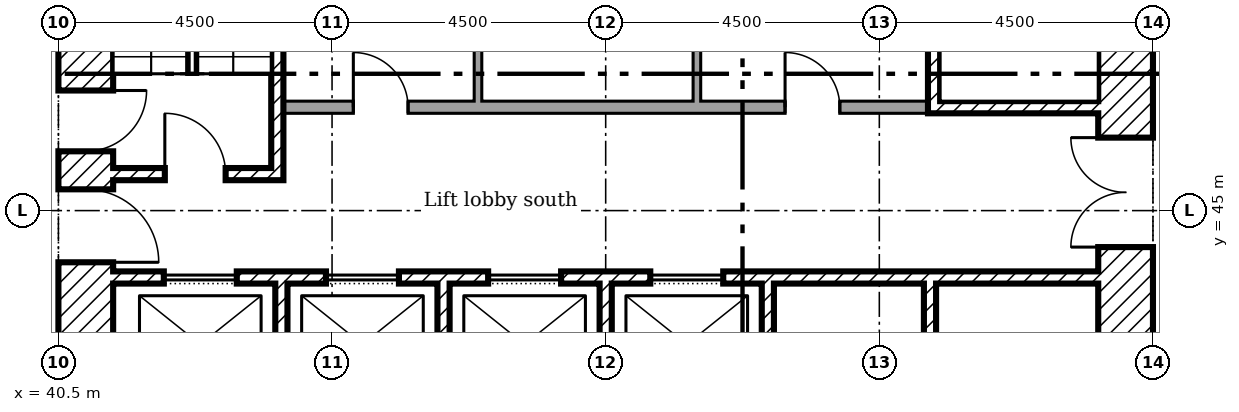
"""IFC4 building model, lengths in metres.
Left out: names, types, materials, properties, quantities, classifications, styles, units other than length and angle.
Written with IfcOpenShell. Run it as: python <this file> out.ifc"""

import sys

from ifc_helpers import new_model, si_unit, direction, frame, frame_2d, origin, place, context, subcontext, project, spatial, rectangle, extrude, element, fill, save


model = new_model("IFC4")
c1 = context("Model", 3, precision=1e-05, world=origin(), true_north=direction((0.0, 1.0)))
c2 = subcontext(c1, "Body", "Model", "MODEL_VIEW")
j1 = project(units=[si_unit("LENGTHUNIT", "METRE"), si_unit("PLANEANGLEUNIT", "RADIAN")], contexts=[c1])
p1 = place(None, origin())
s1 = spatial("IfcSite", under=j1, at=p1, CompositionType="ELEMENT")
p2 = place(p1, origin())
s2 = spatial("IfcBuilding", under=s1, at=p2, CompositionType="ELEMENT")
p3 = place(p2, frame((0.0, 0.0, 29.8)))
s3 = spatial("IfcBuildingStorey", under=s2, at=p3, CompositionType="ELEMENT", Elevation=29.8)
p4 = place(p3, frame((58.05, 40.5, 0.0), z_axis=(0.0, 0.0, 1.0), x_axis=(0.0, 1.0, 0.0)))
e1 = element("IfcWall", 1, at=p4, inside=s3, PredefinedType="SHEAR", context=c2, shape_type="SweptSolid", body=[
    extrude(rectangle(XDim=18.0, YDim=0.9, at=frame_2d((9.0, 0.0))), origin(), (0.0, 0.0, 1.0), 4.125),
])
p5 = place(p4, frame((13.15, 0.0, 0.0)))
e2 = element("IfcOpeningElement", 2, at=p5, cuts=e1, PredefinedType="OPENING", context=c2, shape_type="SweptSolid", body=[
    extrude(rectangle(XDim=1.2, YDim=2.1, at=frame_2d((0.6, 1.05))), frame((0.0, 0.46, 0.0), z_axis=(0.0, -1.0, 0.0), x_axis=(1.0, 0.0, 0.0)), (0.0, 0.0, 1.0), 0.92),
])
p6 = place(p4, frame((3.9, 0.0, 0.0)))
e3 = element("IfcOpeningElement", 3, at=p6, cuts=e1, PredefinedType="OPENING", context=c2, shape_type="SweptSolid", body=[
    extrude(rectangle(XDim=1.8, YDim=2.1, at=frame_2d((0.9, 1.05))), frame((0.0, 0.46, 0.0), z_axis=(0.0, -1.0, 0.0), x_axis=(1.0, 0.0, 0.0)), (0.0, 0.0, 1.0), 0.92),
])
p7 = place(p4, frame((11.525, 0.0, 0.0)))
e4 = element("IfcOpeningElement", 4, at=p7, cuts=e1, PredefinedType="OPENING", context=c2, shape_type="SweptSolid", body=[
    extrude(rectangle(XDim=1.0, YDim=2.1, at=frame_2d((0.5, 1.05))), frame((0.0, 0.46, 0.0), z_axis=(0.0, -1.0, 0.0), x_axis=(1.0, 0.0, 0.0)), (0.0, 0.0, 1.0), 0.92),
])
p8 = place(p3, frame((40.95, 40.5, 0.0), z_axis=(0.0, 0.0, 1.0), x_axis=(0.0, 1.0, 0.0)))
e5 = element("IfcWall", 5, at=p8, inside=s3, PredefinedType="SHEAR", context=c2, shape_type="SweptSolid", body=[
    extrude(rectangle(XDim=18.0, YDim=0.9, at=frame_2d((9.0, 0.0))), origin(), (0.0, 0.0, 1.0), 4.125),
])
p9 = place(p8, frame((3.65, 0.0, 0.0)))
e6 = element("IfcOpeningElement", 6, at=p9, cuts=e5, PredefinedType="OPENING", context=c2, shape_type="SweptSolid", body=[
    extrude(rectangle(XDim=1.2, YDim=2.1, at=frame_2d((0.6, 1.05))), frame((0.0, 0.46, 0.0), z_axis=(0.0, -1.0, 0.0), x_axis=(1.0, 0.0, 0.0)), (0.0, 0.0, 1.0), 0.92),
])
p10 = place(p8, frame((5.475, 0.0, 0.0)))
e7 = element("IfcOpeningElement", 7, at=p10, cuts=e5, PredefinedType="OPENING", context=c2, shape_type="SweptSolid", body=[
    extrude(rectangle(XDim=1.0, YDim=2.1, at=frame_2d((0.5, 1.05))), frame((0.0, 0.46, 0.0), z_axis=(0.0, -1.0, 0.0), x_axis=(1.0, 0.0, 0.0)), (0.0, 0.0, 1.0), 0.92),
])
p11 = place(p8, frame((12.3, 0.0, 0.0)))
e8 = element("IfcOpeningElement", 8, at=p11, cuts=e5, PredefinedType="OPENING", context=c2, shape_type="SweptSolid", body=[
    extrude(rectangle(XDim=1.0, YDim=2.1, at=frame_2d((0.5, 1.05))), frame((0.0, 0.46, 0.0), z_axis=(0.0, -1.0, 0.0), x_axis=(1.0, 0.0, 0.0)), (0.0, 0.0, 1.0), 0.92),
])
for number, where, z_axis, x_axis in (
    (9, (44.167, 41.4, 0.0), (0.0, 0.0, 1.0), (0.0, 1.0, 0.0)),
    (10, (46.833, 41.4, 0.0), (0.0, 0.0, 1.0), (0.0, 1.0, 0.0)),
    (11, (49.5, 41.4, 0.0), (0.0, 0.0, 1.0), (0.0, 1.0, 0.0)),
    (12, (52.167, 41.4, 0.0), (0.0, 0.0, 1.0), (0.0, 1.0, 0.0)),
    (13, (54.833, 41.4, 0.0), (0.0, 0.0, 1.0), (0.0, 1.0, 0.0)),
):
    element("IfcWall", number, at=place(p3, frame(where, z_axis=z_axis, x_axis=x_axis)), inside=s3, PredefinedType="SHEAR", context=c2, shape_type="SweptSolid", body=[
        extrude(rectangle(XDim=2.4, YDim=0.2, at=frame_2d((1.2, 0.0))), origin(), (0.0, 0.0, 1.0), 4.125),
    ])
p12 = place(p3, frame((41.4, 43.9, 0.0)))
e14 = element("IfcWall", 14, at=p12, inside=s3, PredefinedType="SHEAR", context=c2, shape_type="SweptSolid", body=[
    extrude(rectangle(XDim=16.2, YDim=0.2, at=frame_2d((8.1, 0.0))), origin(), (0.0, 0.0, 1.0), 4.125),
])
p13 = place(p12, frame((0.833, 0.0, 0.0)))
e15 = element("IfcOpeningElement", 15, at=p13, cuts=e14, PredefinedType="OPENING", context=c2, shape_type="SweptSolid", body=[
    extrude(rectangle(XDim=1.2, YDim=2.1, at=frame_2d((0.6, 1.05))), frame((0.0, 0.11, 0.0), z_axis=(0.0, -1.0, 0.0), x_axis=(1.0, 0.0, 0.0)), (0.0, 0.0, 1.0), 0.22),
])
p14 = place(p12, frame((3.5, 0.0, 0.0)))
e16 = element("IfcOpeningElement", 16, at=p14, cuts=e14, PredefinedType="OPENING", context=c2, shape_type="SweptSolid", body=[
    extrude(rectangle(XDim=1.2, YDim=2.1, at=frame_2d((0.6, 1.05))), frame((0.0, 0.11, 0.0), z_axis=(0.0, -1.0, 0.0), x_axis=(1.0, 0.0, 0.0)), (0.0, 0.0, 1.0), 0.22),
])
p15 = place(p12, frame((6.167, 0.0, 0.0)))
e17 = element("IfcOpeningElement", 17, at=p15, cuts=e14, PredefinedType="OPENING", context=c2, shape_type="SweptSolid", body=[
    extrude(rectangle(XDim=1.2, YDim=2.1, at=frame_2d((0.6, 1.05))), frame((0.0, 0.11, 0.0), z_axis=(0.0, -1.0, 0.0), x_axis=(1.0, 0.0, 0.0)), (0.0, 0.0, 1.0), 0.22),
])
p16 = place(p12, frame((8.833, 0.0, 0.0)))
e18 = element("IfcOpeningElement", 18, at=p16, cuts=e14, PredefinedType="OPENING", context=c2, shape_type="SweptSolid", body=[
    extrude(rectangle(XDim=1.2, YDim=2.1, at=frame_2d((0.6, 1.05))), frame((0.0, 0.11, 0.0), z_axis=(0.0, -1.0, 0.0), x_axis=(1.0, 0.0, 0.0)), (0.0, 0.0, 1.0), 0.22),
])
p17 = place(p3, frame((44.1, 45.5, 0.0), z_axis=(0.0, 0.0, 1.0), x_axis=(0.0, 1.0, 0.0)))
e19 = element("IfcWall", 19, at=p17, inside=s3, PredefinedType="SHEAR", context=c2, shape_type="SweptSolid", body=[
    extrude(rectangle(XDim=6.9, YDim=0.2, at=frame_2d((3.45, 0.0))), origin(), (0.0, 0.0, 1.0), 4.125),
])
p18 = place(p3, frame((41.4, 45.6, 0.0)))
e20 = element("IfcWall", 20, at=p18, inside=s3, PredefinedType="SHEAR", context=c2, shape_type="SweptSolid", body=[
    extrude(rectangle(XDim=2.6, YDim=0.2, at=frame_2d((1.3, 0.0))), origin(), (0.0, 0.0, 1.0), 4.125),
])
p19 = place(p18, frame((0.85, 0.0, 0.0)))
e21 = element("IfcOpeningElement", 21, at=p19, cuts=e20, PredefinedType="OPENING", context=c2, shape_type="SweptSolid", body=[
    extrude(rectangle(XDim=1.0, YDim=2.1, at=frame_2d((0.5, 1.05))), frame((0.0, 0.11, 0.0), z_axis=(0.0, -1.0, 0.0), x_axis=(1.0, 0.0, 0.0)), (0.0, 0.0, 1.0), 0.22),
])
p20 = place(p3, frame((54.8, 46.7, 0.0)))
e22 = element("IfcWall", 22, at=p20, inside=s3, PredefinedType="SHEAR", context=c2, shape_type="SweptSolid", body=[
    extrude(rectangle(XDim=2.8, YDim=0.2, at=frame_2d((1.4, 0.0))), origin(), (0.0, 0.0, 1.0), 4.125),
])
p21 = place(p3, frame((54.9, 46.8, 0.0), z_axis=(0.0, 0.0, 1.0), x_axis=(0.0, 1.0, 0.0)))
e23 = element("IfcWall", 23, at=p21, inside=s3, PredefinedType="SHEAR", context=c2, shape_type="SweptSolid", body=[
    extrude(rectangle(XDim=6.5, YDim=0.2, at=frame_2d((3.25, 0.0))), origin(), (0.0, 0.0, 1.0), 4.125),
])
p22 = place(p3, frame((44.2, 46.7, 0.0)))
e24 = element("IfcWall", 24, at=p22, inside=s3, PredefinedType="PARTITIONING", context=c2, shape_type="SweptSolid", body=[
    extrude(rectangle(XDim=10.6, YDim=0.2, at=frame_2d((5.3, 0.0))), origin(), (0.0, 0.0, 1.0), 4.125),
])
p23 = place(p22, frame((1.15, 0.0, 0.0)))
e25 = element("IfcOpeningElement", 25, at=p23, cuts=e24, PredefinedType="OPENING", context=c2, shape_type="SweptSolid", body=[
    extrude(rectangle(XDim=0.9, YDim=2.1, at=frame_2d((0.45, 1.05))), frame((0.0, 0.11, 0.0), z_axis=(0.0, -1.0, 0.0), x_axis=(1.0, 0.0, 0.0)), (0.0, 0.0, 1.0), 0.22),
])
p24 = place(p22, frame((8.25, 0.0, 0.0)))
e26 = element("IfcOpeningElement", 26, at=p24, cuts=e24, PredefinedType="OPENING", context=c2, shape_type="SweptSolid", body=[
    extrude(rectangle(XDim=0.9, YDim=2.1, at=frame_2d((0.45, 1.05))), frame((0.0, 0.11, 0.0), z_axis=(0.0, -1.0, 0.0), x_axis=(1.0, 0.0, 0.0)), (0.0, 0.0, 1.0), 0.22),
])
p25 = place(p3, frame((47.4, 46.8, 0.0), z_axis=(0.0, 0.0, 1.0), x_axis=(0.0, 1.0, 0.0)))
e27 = element("IfcWall", 27, at=p25, inside=s3, PredefinedType="PARTITIONING", context=c2, shape_type="SweptSolid", body=[
    extrude(rectangle(XDim=5.0, YDim=0.125, at=frame_2d((2.5, 0.0))), origin(), (0.0, 0.0, 1.0), 4.125),
])
p26 = place(p3, frame((51.0, 46.8, 0.0), z_axis=(0.0, 0.0, 1.0), x_axis=(0.0, 1.0, 0.0)))
e28 = element("IfcWall", 28, at=p26, inside=s3, PredefinedType="PARTITIONING", context=c2, shape_type="SweptSolid", body=[
    extrude(rectangle(XDim=2.262, YDim=0.125, at=frame_2d((1.131, 0.0))), origin(), (0.0, 0.0, 1.0), 4.125),
])
p27 = place(p6, origin())
e29 = element("IfcDoor", 29, at=p27, inside=s3, OperationType="DOUBLE_DOOR_SINGLE_SWING", PredefinedType="DOOR", context=c2, shape_type="SweptSolid", body=[
    extrude(rectangle(XDim=1.8, YDim=2.1, at=frame_2d((0.9, 1.05))), frame((0.0, 0.025, 0.0), z_axis=(0.0, -1.0, 0.0), x_axis=(1.0, 0.0, 0.0)), (0.0, 0.0, 1.0), 0.05),
])
fill(e3, e29)
p28 = place(p9, frame((1.2, 0.0, 0.0), x_axis=(-1.0, 0.0, 0.0)))
e30 = element("IfcDoor", 30, at=p28, inside=s3, OperationType="SINGLE_SWING_LEFT", PredefinedType="DOOR", context=c2, shape_type="SweptSolid", body=[
    extrude(rectangle(XDim=1.2, YDim=2.1, at=frame_2d((0.6, 1.05))), frame((0.0, 0.025, 0.0), z_axis=(0.0, -1.0, 0.0), x_axis=(1.0, 0.0, 0.0)), (0.0, 0.0, 1.0), 0.05),
])
fill(e6, e30)
p29 = place(p19, origin())
e31 = element("IfcDoor", 31, at=p29, inside=s3, OperationType="SINGLE_SWING_RIGHT", PredefinedType="DOOR", context=c2, shape_type="SweptSolid", body=[
    extrude(rectangle(XDim=1.0, YDim=2.1, at=frame_2d((0.5, 1.05))), frame((0.0, 0.025, 0.0), z_axis=(0.0, -1.0, 0.0), x_axis=(1.0, 0.0, 0.0)), (0.0, 0.0, 1.0), 0.05),
])
fill(e21, e31)
p30 = place(p10, frame((1.0, 0.0, 0.0), x_axis=(-1.0, 0.0, 0.0)))
e32 = element("IfcDoor", 32, at=p30, inside=s3, OperationType="SINGLE_SWING_RIGHT", PredefinedType="DOOR", context=c2, shape_type="SweptSolid", body=[
    extrude(rectangle(XDim=1.0, YDim=2.1, at=frame_2d((0.5, 1.05))), frame((0.0, 0.025, 0.0), z_axis=(0.0, -1.0, 0.0), x_axis=(1.0, 0.0, 0.0)), (0.0, 0.0, 1.0), 0.05),
])
fill(e7, e32)
p31 = place(p23, origin())
e33 = element("IfcDoor", 33, at=p31, inside=s3, OperationType="SINGLE_SWING_RIGHT", PredefinedType="DOOR", context=c2, shape_type="SweptSolid", body=[
    extrude(rectangle(XDim=0.9, YDim=2.1, at=frame_2d((0.45, 1.05))), frame((0.0, 0.025, 0.0), z_axis=(0.0, -1.0, 0.0), x_axis=(1.0, 0.0, 0.0)), (0.0, 0.0, 1.0), 0.05),
])
fill(e25, e33)
p32 = place(p24, origin())
e34 = element("IfcDoor", 34, at=p32, inside=s3, OperationType="SINGLE_SWING_RIGHT", PredefinedType="DOOR", context=c2, shape_type="SweptSolid", body=[
    extrude(rectangle(XDim=0.9, YDim=2.1, at=frame_2d((0.45, 1.05))), frame((0.0, 0.025, 0.0), z_axis=(0.0, -1.0, 0.0), x_axis=(1.0, 0.0, 0.0)), (0.0, 0.0, 1.0), 0.05),
])
fill(e26, e34)
p33 = place(p13, origin())
e35 = element("IfcDoor", 35, at=p33, inside=s3, OperationType="SLIDING_TO_LEFT", PredefinedType="DOOR", context=c2, shape_type="SweptSolid", body=[
    extrude(rectangle(XDim=1.2, YDim=2.1, at=frame_2d((0.6, 1.05))), frame((0.0, 0.025, 0.0), z_axis=(0.0, -1.0, 0.0), x_axis=(1.0, 0.0, 0.0)), (0.0, 0.0, 1.0), 0.05),
])
fill(e15, e35)
p34 = place(p14, origin())
e36 = element("IfcDoor", 36, at=p34, inside=s3, OperationType="SLIDING_TO_LEFT", PredefinedType="DOOR", context=c2, shape_type="SweptSolid", body=[
    extrude(rectangle(XDim=1.2, YDim=2.1, at=frame_2d((0.6, 1.05))), frame((0.0, 0.025, 0.0), z_axis=(0.0, -1.0, 0.0), x_axis=(1.0, 0.0, 0.0)), (0.0, 0.0, 1.0), 0.05),
])
fill(e16, e36)
p35 = place(p15, origin())
e37 = element("IfcDoor", 37, at=p35, inside=s3, OperationType="SLIDING_TO_LEFT", PredefinedType="DOOR", context=c2, shape_type="SweptSolid", body=[
    extrude(rectangle(XDim=1.2, YDim=2.1, at=frame_2d((0.6, 1.05))), frame((0.0, 0.025, 0.0), z_axis=(0.0, -1.0, 0.0), x_axis=(1.0, 0.0, 0.0)), (0.0, 0.0, 1.0), 0.05),
])
fill(e17, e37)
p36 = place(p16, origin())
e38 = element("IfcDoor", 38, at=p36, inside=s3, OperationType="SLIDING_TO_LEFT", PredefinedType="DOOR", context=c2, shape_type="SweptSolid", body=[
    extrude(rectangle(XDim=1.2, YDim=2.1, at=frame_2d((0.6, 1.05))), frame((0.0, 0.025, 0.0), z_axis=(0.0, -1.0, 0.0), x_axis=(1.0, 0.0, 0.0)), (0.0, 0.0, 1.0), 0.05),
])
fill(e18, e38)
save(model, sys.argv[1])
